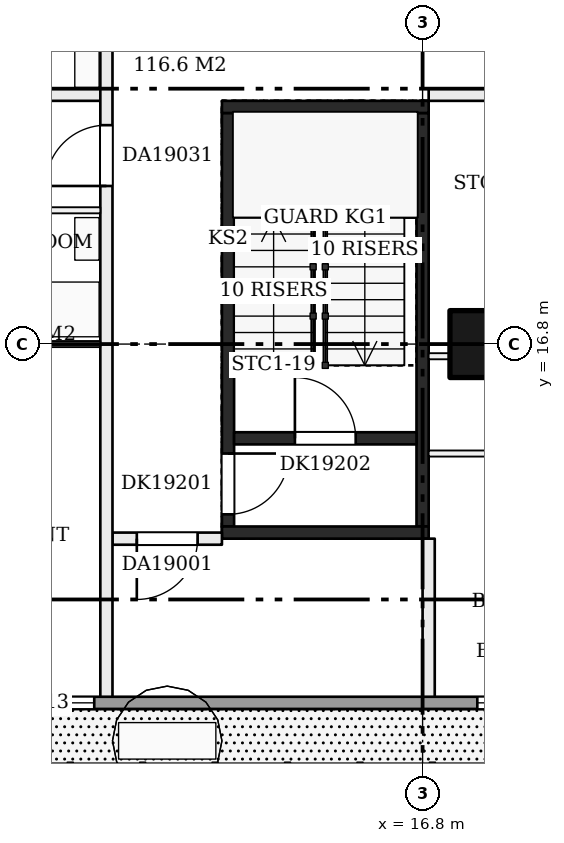
"""IFC4 building model, lengths in metres.
Left out: names, types, materials, properties, quantities, classifications, styles, units other than length and angle.
Written with IfcOpenShell. Run it as: python <this file> out.ifc"""

import sys

from ifc_helpers import new_model, si_unit, direction, frame, frame_2d, origin, origin_2d, place, context, subcontext, project, spatial, rectangle, extrude, element, fill, save


model = new_model("IFC4")
c1 = context("Model", 3, precision=1e-05, world=origin(), true_north=direction((0.0, 1.0)))
c2 = subcontext(c1, "Body", "Model", "MODEL_VIEW")
j1 = project(units=[si_unit("LENGTHUNIT", "METRE"), si_unit("PLANEANGLEUNIT", "RADIAN")], contexts=[c1])
p1 = place(None, origin())
s1 = spatial("IfcSite", under=j1, at=p1, CompositionType="ELEMENT")
p2 = place(p1, origin())
s2 = spatial("IfcBuilding", under=s1, at=p2, CompositionType="ELEMENT")
p3 = place(p2, frame((0.0, 0.0, 81.2)))
s3 = spatial("IfcBuildingStorey", under=s2, at=p3, CompositionType="ELEMENT", Elevation=81.2)
p4 = place(p3, frame((17.8, 16.8, 0.0), z_axis=(0.0, 0.0, 1.0), x_axis=(1.0, 0.0, 0.0)))
e1 = element("IfcColumn", 1, at=p4, inside=s3, PredefinedType="COLUMN", context=c2, shape_type="SweptSolid", body=[
    extrude(rectangle(XDim=1.1, YDim=1.1, at=origin_2d()), origin(), (0.0, 0.0, 1.0), 3.22),
])
p5 = place(p3, frame((13.6, 13.8, 0.0), z_axis=(0.0, 0.0, 1.0), x_axis=(0.0, 1.0, 0.0)))
e2 = element("IfcWall", 2, at=p5, inside=s3, PredefinedType="SHEAR", context=c2, shape_type="SweptSolid", body=[
    extrude(rectangle(XDim=6.8, YDim=0.2, at=frame_2d((3.4, 0.0))), origin(), (0.0, 0.0, 1.0), 3.22),
])
p6 = place(p5, frame((0.2, 0.0, 0.0)))
e3 = element("IfcOpeningElement", 3, at=p6, cuts=e2, PredefinedType="OPENING", context=c2, shape_type="SweptSolid", body=[
    extrude(rectangle(XDim=1.0, YDim=2.1, at=frame_2d((0.5, 1.05))), frame((0.0, 0.11, 0.0), z_axis=(0.0, -1.0, 0.0), x_axis=(1.0, 0.0, 0.0)), (0.0, 0.0, 1.0), 0.22),
])
p7 = place(p3, frame((16.8, 13.8, 0.0), z_axis=(0.0, 0.0, 1.0), x_axis=(0.0, 1.0, 0.0)))
e4 = element("IfcWall", 4, at=p7, inside=s3, PredefinedType="SHEAR", context=c2, shape_type="SweptSolid", body=[
    extrude(rectangle(XDim=6.8, YDim=0.2, at=frame_2d((3.4, 0.0))), origin(), (0.0, 0.0, 1.0), 3.22),
])
for number, where, z_axis, x_axis in (
    (5, (13.5, 13.7, 0.0), (0.0, 0.0, 1.0), (1.0, 0.0, 0.0)),
    (6, (13.5, 20.7, 0.0), (0.0, 0.0, 1.0), (1.0, 0.0, 0.0)),
):
    element("IfcWall", number, at=place(p3, frame(where, z_axis=z_axis, x_axis=x_axis)), inside=s3, PredefinedType="SHEAR", context=c2, shape_type="SweptSolid", body=[
        extrude(rectangle(XDim=3.4, YDim=0.2, at=frame_2d((1.7, 0.0))), origin(), (0.0, 0.0, 1.0), 3.22),
    ])
p8 = place(p3, frame((13.7, 15.25, 0.0), z_axis=(0.0, 0.0, 1.0), x_axis=(1.0, 0.0, 0.0)))
e7 = element("IfcWall", 7, at=p8, inside=s3, PredefinedType="SHEAR", context=c2, shape_type="SweptSolid", body=[
    extrude(rectangle(XDim=3.0, YDim=0.2, at=frame_2d((1.5, 0.0))), origin(), (0.0, 0.0, 1.0), 3.22),
])
p9 = place(p8, frame((1.0, 0.0, 0.0)))
e8 = element("IfcOpeningElement", 8, at=p9, cuts=e7, PredefinedType="OPENING", context=c2, shape_type="SweptSolid", body=[
    extrude(rectangle(XDim=1.0, YDim=2.1, at=frame_2d((0.5, 1.05))), frame((0.0, 0.11, 0.0), z_axis=(0.0, -1.0, 0.0), x_axis=(1.0, 0.0, 0.0)), (0.0, 0.0, 1.0), 0.22),
])
p10 = place(p3, frame((11.7, 13.6, 0.0), z_axis=(0.0, 0.0, 1.0), x_axis=(1.0, 0.0, 0.0)))
e9 = element("IfcWall", 9, at=p10, inside=s3, PredefinedType="PARTITIONING", context=c2, shape_type="SweptSolid", body=[
    extrude(rectangle(XDim=1.8, YDim=0.2, at=frame_2d((0.9, 0.0))), origin(), (0.0, 0.0, 1.0), 3.22),
])
p11 = place(p10, frame((0.4, 0.0, 0.0)))
e10 = element("IfcOpeningElement", 10, at=p11, cuts=e9, PredefinedType="OPENING", context=c2, shape_type="SweptSolid", body=[
    extrude(rectangle(XDim=1.0, YDim=2.1, at=frame_2d((0.5, 1.05))), frame((0.0, 0.11, 0.0), z_axis=(0.0, -1.0, 0.0), x_axis=(1.0, 0.0, 0.0)), (0.0, 0.0, 1.0), 0.22),
])
p12 = place(p3, frame((16.9, 15.0, 0.0), z_axis=(0.0, 0.0, 1.0), x_axis=(1.0, 0.0, 0.0)))
e11 = element("IfcWall", 11, at=p12, inside=s3, PredefinedType="PARTITIONING", context=c2, shape_type="SweptSolid", body=[
    extrude(rectangle(XDim=23.1, YDim=0.1, at=frame_2d((11.55, 0.0))), origin(), (0.0, 0.0, 1.0), 3.22),
])
p13 = place(p12, frame((1.6, 0.0, 0.0)))
e12 = element("IfcOpeningElement", 12, at=p13, cuts=e11, PredefinedType="OPENING", context=c2, shape_type="SweptSolid", body=[
    extrude(rectangle(XDim=0.9, YDim=2.1, at=frame_2d((0.45, 1.05))), frame((0.0, 0.06, 0.0), z_axis=(0.0, -1.0, 0.0), x_axis=(1.0, 0.0, 0.0)), (0.0, 0.0, 1.0), 0.12),
])
p14 = place(p12, frame((7.1, 0.0, 0.0)))
e13 = element("IfcOpeningElement", 13, at=p14, cuts=e11, PredefinedType="OPENING", context=c2, shape_type="SweptSolid", body=[
    extrude(rectangle(XDim=0.9, YDim=2.1, at=frame_2d((0.45, 1.05))), frame((0.0, 0.06, 0.0), z_axis=(0.0, -1.0, 0.0), x_axis=(1.0, 0.0, 0.0)), (0.0, 0.0, 1.0), 0.12),
])
p15 = place(p12, frame((14.1, 0.0, 0.0)))
e14 = element("IfcOpeningElement", 14, at=p15, cuts=e11, PredefinedType="OPENING", context=c2, shape_type="SweptSolid", body=[
    extrude(rectangle(XDim=0.9, YDim=2.1, at=frame_2d((0.45, 1.05))), frame((0.0, 0.06, 0.0), z_axis=(0.0, -1.0, 0.0), x_axis=(1.0, 0.0, 0.0)), (0.0, 0.0, 1.0), 0.12),
])
p16 = place(p12, frame((19.5, 0.0, 0.0)))
e15 = element("IfcOpeningElement", 15, at=p16, cuts=e11, PredefinedType="OPENING", context=c2, shape_type="SweptSolid", body=[
    extrude(rectangle(XDim=0.9, YDim=2.1, at=frame_2d((0.45, 1.05))), frame((0.0, 0.06, 0.0), z_axis=(0.0, -1.0, 0.0), x_axis=(1.0, 0.0, 0.0)), (0.0, 0.0, 1.0), 0.12),
])
p17 = place(p3, frame((16.9, 16.6, 0.0), z_axis=(0.0, 0.0, 1.0), x_axis=(1.0, 0.0, 0.0)))
e16 = element("IfcWall", 16, at=p17, inside=s3, PredefinedType="PARTITIONING", context=c2, shape_type="SweptSolid", body=[
    extrude(rectangle(XDim=23.1, YDim=0.1, at=frame_2d((11.55, 0.0))), origin(), (0.0, 0.0, 1.0), 3.22),
])
p18 = place(p17, frame((9.1, 0.0, 0.0)))
e17 = element("IfcOpeningElement", 17, at=p18, cuts=e16, PredefinedType="OPENING", context=c2, shape_type="SweptSolid", body=[
    extrude(rectangle(XDim=0.9, YDim=2.1, at=frame_2d((0.45, 1.05))), frame((0.0, 0.06, 0.0), z_axis=(0.0, -1.0, 0.0), x_axis=(1.0, 0.0, 0.0)), (0.0, 0.0, 1.0), 0.12),
])
p19 = place(p17, frame((2.6, 0.0, 0.0)))
e18 = element("IfcOpeningElement", 18, at=p19, cuts=e16, PredefinedType="OPENING", context=c2, shape_type="SweptSolid", body=[
    extrude(rectangle(XDim=0.9, YDim=2.1, at=frame_2d((0.45, 1.05))), frame((0.0, 0.06, 0.0), z_axis=(0.0, -1.0, 0.0), x_axis=(1.0, 0.0, 0.0)), (0.0, 0.0, 1.0), 0.12),
])
p20 = place(p17, frame((14.05, 0.0, 0.0)))
e19 = element("IfcOpeningElement", 19, at=p20, cuts=e16, PredefinedType="OPENING", context=c2, shape_type="SweptSolid", body=[
    extrude(rectangle(XDim=0.9, YDim=2.1, at=frame_2d((0.45, 1.05))), frame((0.0, 0.06, 0.0), z_axis=(0.0, -1.0, 0.0), x_axis=(1.0, 0.0, 0.0)), (0.0, 0.0, 1.0), 0.12),
])
p21 = place(p17, frame((19.65, 0.0, 0.0)))
e20 = element("IfcOpeningElement", 20, at=p21, cuts=e16, PredefinedType="OPENING", context=c2, shape_type="SweptSolid", body=[
    extrude(rectangle(XDim=0.9, YDim=2.1, at=frame_2d((0.45, 1.05))), frame((0.0, 0.06, 0.0), z_axis=(0.0, -1.0, 0.0), x_axis=(1.0, 0.0, 0.0)), (0.0, 0.0, 1.0), 0.12),
])
p22 = place(p3, frame((2.5, 16.8, 0.0), z_axis=(0.0, 0.0, 1.0), x_axis=(1.0, 0.0, 0.0)))
e21 = element("IfcWall", 21, at=p22, inside=s3, PredefinedType="PARTITIONING", context=c2, shape_type="SweptSolid", body=[
    extrude(rectangle(XDim=9.0, YDim=0.1, at=frame_2d((4.5, 0.0))), origin(), (0.0, 0.0, 1.0), 3.22),
])
p23 = place(p22, frame((4.3, 0.0, 0.0)))
e22 = element("IfcOpeningElement", 22, at=p23, cuts=e21, PredefinedType="OPENING", context=c2, shape_type="SweptSolid", body=[
    extrude(rectangle(XDim=0.9, YDim=2.1, at=frame_2d((0.45, 1.05))), frame((0.0, 0.06, 0.0), z_axis=(0.0, -1.0, 0.0), x_axis=(1.0, 0.0, 0.0)), (0.0, 0.0, 1.0), 0.12),
])
p24 = place(p3, frame((8.05, 19.0, 0.0), z_axis=(0.0, 0.0, 1.0), x_axis=(1.0, 0.0, 0.0)))
e23 = element("IfcWall", 23, at=p24, inside=s3, PredefinedType="PARTITIONING", context=c2, shape_type="SweptSolid", body=[
    extrude(rectangle(XDim=3.45, YDim=0.1, at=frame_2d((1.725, 0.0))), origin(), (0.0, 0.0, 1.0), 3.22),
])
p25 = place(p3, frame((2.5, 20.9, 0.0), z_axis=(0.0, 0.0, 1.0), x_axis=(1.0, 0.0, 0.0)))
e24 = element("IfcWall", 24, at=p25, inside=s3, PredefinedType="PARTITIONING", context=c2, shape_type="SweptSolid", body=[
    extrude(rectangle(XDim=9.0, YDim=0.2, at=frame_2d((4.5, 0.0))), origin(), (0.0, 0.0, 1.0), 3.22),
])
p26 = place(p3, frame((16.9, 20.9, 0.0), z_axis=(0.0, 0.0, 1.0), x_axis=(1.0, 0.0, 0.0)))
e25 = element("IfcWall", 25, at=p26, inside=s3, PredefinedType="PARTITIONING", context=c2, shape_type="SweptSolid", body=[
    extrude(rectangle(XDim=23.3, YDim=0.2, at=frame_2d((11.65, 0.0))), origin(), (0.0, 0.0, 1.0), 3.22),
])
p27 = place(p26, frame((8.5, 0.0, 0.0)))
e26 = element("IfcOpeningElement", 26, at=p27, cuts=e25, PredefinedType="OPENING", context=c2, shape_type="SweptSolid", body=[
    extrude(rectangle(XDim=1.0, YDim=2.1, at=frame_2d((0.5, 1.05))), frame((0.0, 0.11, 0.0), z_axis=(0.0, -1.0, 0.0), x_axis=(1.0, 0.0, 0.0)), (0.0, 0.0, 1.0), 0.22),
])
p28 = place(p3, frame((11.6, 10.9, 0.0), z_axis=(0.0, 0.0, 1.0), x_axis=(0.0, 1.0, 0.0)))
e27 = element("IfcWall", 27, at=p28, inside=s3, PredefinedType="PARTITIONING", context=c2, shape_type="SweptSolid", body=[
    extrude(rectangle(XDim=31.1, YDim=0.2, at=frame_2d((15.55, 0.0))), origin(), (0.0, 0.0, 1.0), 3.22),
])
p29 = place(p28, frame((8.5, 0.0, 0.0)))
e28 = element("IfcOpeningElement", 28, at=p29, cuts=e27, PredefinedType="OPENING", context=c2, shape_type="SweptSolid", body=[
    extrude(rectangle(XDim=1.0, YDim=2.1, at=frame_2d((0.5, 1.05))), frame((0.0, 0.11, 0.0), z_axis=(0.0, -1.0, 0.0), x_axis=(1.0, 0.0, 0.0)), (0.0, 0.0, 1.0), 0.22),
])
p30 = place(p28, frame((15.98, 0.0, 0.0)))
e29 = element("IfcOpeningElement", 29, at=p30, cuts=e27, PredefinedType="OPENING", context=c2, shape_type="SweptSolid", body=[
    extrude(rectangle(XDim=1.0, YDim=2.1, at=frame_2d((0.5, 1.05))), frame((0.0, 0.11, 0.0), z_axis=(0.0, -1.0, 0.0), x_axis=(1.0, 0.0, 0.0)), (0.0, 0.0, 1.0), 0.22),
])
p31 = place(p3, frame((16.9, 10.9, 0.0), z_axis=(0.0, 0.0, 1.0), x_axis=(0.0, 1.0, 0.0)))
e30 = element("IfcWall", 30, at=p31, inside=s3, PredefinedType="PARTITIONING", context=c2, shape_type="SweptSolid", body=[
    extrude(rectangle(XDim=2.7, YDim=0.2, at=frame_2d((1.35, 0.0))), origin(), (0.0, 0.0, 1.0), 3.22),
])
p32 = place(p3, frame((4.8, 10.9, 0.0), z_axis=(0.0, 0.0, 1.0), x_axis=(1.0, 0.0, 0.0)))
e31 = element("IfcWall", 31, at=p32, inside=s3, PredefinedType="SOLIDWALL", context=c2, shape_type="SweptSolid", body=[
    extrude(rectangle(XDim=37.2, YDim=0.2, at=frame_2d((18.6, 0.0))), origin(), (0.0, 0.0, 1.0), 3.22),
])
p33 = place(p32, frame((0.3, 0.0, 0.9)))
e32 = element("IfcOpeningElement", 32, at=p33, cuts=e31, PredefinedType="OPENING", context=c2, shape_type="SweptSolid", body=[
    extrude(rectangle(XDim=2.4, YDim=1.5, at=frame_2d((1.2, 0.75))), frame((0.0, 0.11, 0.0), z_axis=(0.0, -1.0, 0.0), x_axis=(1.0, 0.0, 0.0)), (0.0, 0.0, 1.0), 0.22),
])
p34 = place(p32, frame((4.2, 0.0, 0.9)))
e33 = element("IfcOpeningElement", 33, at=p34, cuts=e31, PredefinedType="OPENING", context=c2, shape_type="SweptSolid", body=[
    extrude(rectangle(XDim=2.4, YDim=1.5, at=frame_2d((1.2, 0.75))), frame((0.0, 0.11, 0.0), z_axis=(0.0, -1.0, 0.0), x_axis=(1.0, 0.0, 0.0)), (0.0, 0.0, 1.0), 0.22),
])
p35 = place(p32, frame((12.9, 0.0, 0.9)))
e34 = element("IfcOpeningElement", 34, at=p35, cuts=e31, PredefinedType="OPENING", context=c2, shape_type="SweptSolid", body=[
    extrude(rectangle(XDim=2.4, YDim=1.5, at=frame_2d((1.2, 0.75))), frame((0.0, 0.11, 0.0), z_axis=(0.0, -1.0, 0.0), x_axis=(1.0, 0.0, 0.0)), (0.0, 0.0, 1.0), 0.22),
])
p36 = place(p32, frame((17.1, 0.0, 0.0)))
e35 = element("IfcOpeningElement", 35, at=p36, cuts=e31, PredefinedType="OPENING", context=c2, shape_type="SweptSolid", body=[
    extrude(rectangle(XDim=2.4, YDim=2.2, at=frame_2d((1.2, 1.1))), frame((0.0, 0.11, 0.0), z_axis=(0.0, -1.0, 0.0), x_axis=(1.0, 0.0, 0.0)), (0.0, 0.0, 1.0), 0.22),
])
p37 = place(p32, frame((21.3, 0.0, 0.0)))
e36 = element("IfcOpeningElement", 36, at=p37, cuts=e31, PredefinedType="OPENING", context=c2, shape_type="SweptSolid", body=[
    extrude(rectangle(XDim=2.4, YDim=2.2, at=frame_2d((1.2, 1.1))), frame((0.0, 0.11, 0.0), z_axis=(0.0, -1.0, 0.0), x_axis=(1.0, 0.0, 0.0)), (0.0, 0.0, 1.0), 0.22),
])
p38 = place(p32, frame((25.5, 0.0, 0.9)))
e37 = element("IfcOpeningElement", 37, at=p38, cuts=e31, PredefinedType="OPENING", context=c2, shape_type="SweptSolid", body=[
    extrude(rectangle(XDim=2.4, YDim=1.5, at=frame_2d((1.2, 0.75))), frame((0.0, 0.11, 0.0), z_axis=(0.0, -1.0, 0.0), x_axis=(1.0, 0.0, 0.0)), (0.0, 0.0, 1.0), 0.22),
])
p39 = place(p32, frame((29.7, 0.0, 0.9)))
e38 = element("IfcOpeningElement", 38, at=p39, cuts=e31, PredefinedType="OPENING", context=c2, shape_type="SweptSolid", body=[
    extrude(rectangle(XDim=2.4, YDim=1.5, at=frame_2d((1.2, 0.75))), frame((0.0, 0.11, 0.0), z_axis=(0.0, -1.0, 0.0), x_axis=(1.0, 0.0, 0.0)), (0.0, 0.0, 1.0), 0.22),
])
p40 = place(p32, frame((33.9, 0.0, 0.9)))
e39 = element("IfcOpeningElement", 39, at=p40, cuts=e31, PredefinedType="OPENING", context=c2, shape_type="SweptSolid", body=[
    extrude(rectangle(XDim=1.3, YDim=1.5, at=frame_2d((0.65, 0.75))), frame((0.0, 0.11, 0.0), z_axis=(0.0, -1.0, 0.0), x_axis=(1.0, 0.0, 0.0)), (0.0, 0.0, 1.0), 0.22),
])
p41 = place(p6, frame((1.0, 0.0, 0.0), z_axis=(0.0, 0.0, 1.0), x_axis=(-1.0, 0.0, 0.0)))
e40 = element("IfcDoor", 40, at=p41, inside=s3, OperationType="SINGLE_SWING_LEFT", PredefinedType="DOOR", context=c2, shape_type="SweptSolid", body=[
    extrude(rectangle(XDim=1.0, YDim=2.1, at=frame_2d((0.5, 1.05))), frame((0.0, 0.025, 0.0), z_axis=(0.0, -1.0, 0.0), x_axis=(1.0, 0.0, 0.0)), (0.0, 0.0, 1.0), 0.05),
])
fill(e3, e40)
p42 = place(p9, origin())
e41 = element("IfcDoor", 41, at=p42, inside=s3, OperationType="SINGLE_SWING_LEFT", PredefinedType="DOOR", context=c2, shape_type="SweptSolid", body=[
    extrude(rectangle(XDim=1.0, YDim=2.1, at=frame_2d((0.5, 1.05))), frame((0.0, 0.025, 0.0), z_axis=(0.0, -1.0, 0.0), x_axis=(1.0, 0.0, 0.0)), (0.0, 0.0, 1.0), 0.05),
])
fill(e8, e41)
p43 = place(p11, frame((1.0, 0.0, 0.0), z_axis=(0.0, 0.0, 1.0), x_axis=(-1.0, 0.0, 0.0)))
e42 = element("IfcDoor", 42, at=p43, inside=s3, OperationType="SINGLE_SWING_RIGHT", PredefinedType="DOOR", context=c2, shape_type="SweptSolid", body=[
    extrude(rectangle(XDim=1.0, YDim=2.1, at=frame_2d((0.5, 1.05))), frame((0.0, 0.025, 0.0), z_axis=(0.0, -1.0, 0.0), x_axis=(1.0, 0.0, 0.0)), (0.0, 0.0, 1.0), 0.05),
])
fill(e10, e42)
p44 = place(p29, origin())
e43 = element("IfcDoor", 43, at=p44, inside=s3, OperationType="SINGLE_SWING_LEFT", PredefinedType="DOOR", context=c2, shape_type="SweptSolid", body=[
    extrude(rectangle(XDim=1.0, YDim=2.1, at=frame_2d((0.5, 1.05))), frame((0.0, 0.025, 0.0), z_axis=(0.0, -1.0, 0.0), x_axis=(1.0, 0.0, 0.0)), (0.0, 0.0, 1.0), 0.05),
])
fill(e28, e43)
p45 = place(p34, origin())
e44 = element("IfcWindow", 44, at=p45, inside=s3, PartitioningType="SINGLE_PANEL", PredefinedType="WINDOW", context=c2, shape_type="SweptSolid", body=[
    extrude(rectangle(XDim=2.4, YDim=1.5, at=frame_2d((1.2, 0.75))), frame((0.0, 0.03, 0.0), z_axis=(0.0, -1.0, 0.0), x_axis=(1.0, 0.0, 0.0)), (0.0, 0.0, 1.0), 0.06),
])
fill(e33, e44)
p46 = place(p35, origin())
e45 = element("IfcWindow", 45, at=p46, inside=s3, PartitioningType="SINGLE_PANEL", PredefinedType="WINDOW", context=c2, shape_type="SweptSolid", body=[
    extrude(rectangle(XDim=2.4, YDim=1.5, at=frame_2d((1.2, 0.75))), frame((0.0, 0.03, 0.0), z_axis=(0.0, -1.0, 0.0), x_axis=(1.0, 0.0, 0.0)), (0.0, 0.0, 1.0), 0.06),
])
fill(e34, e45)
save(model, sys.argv[1])
